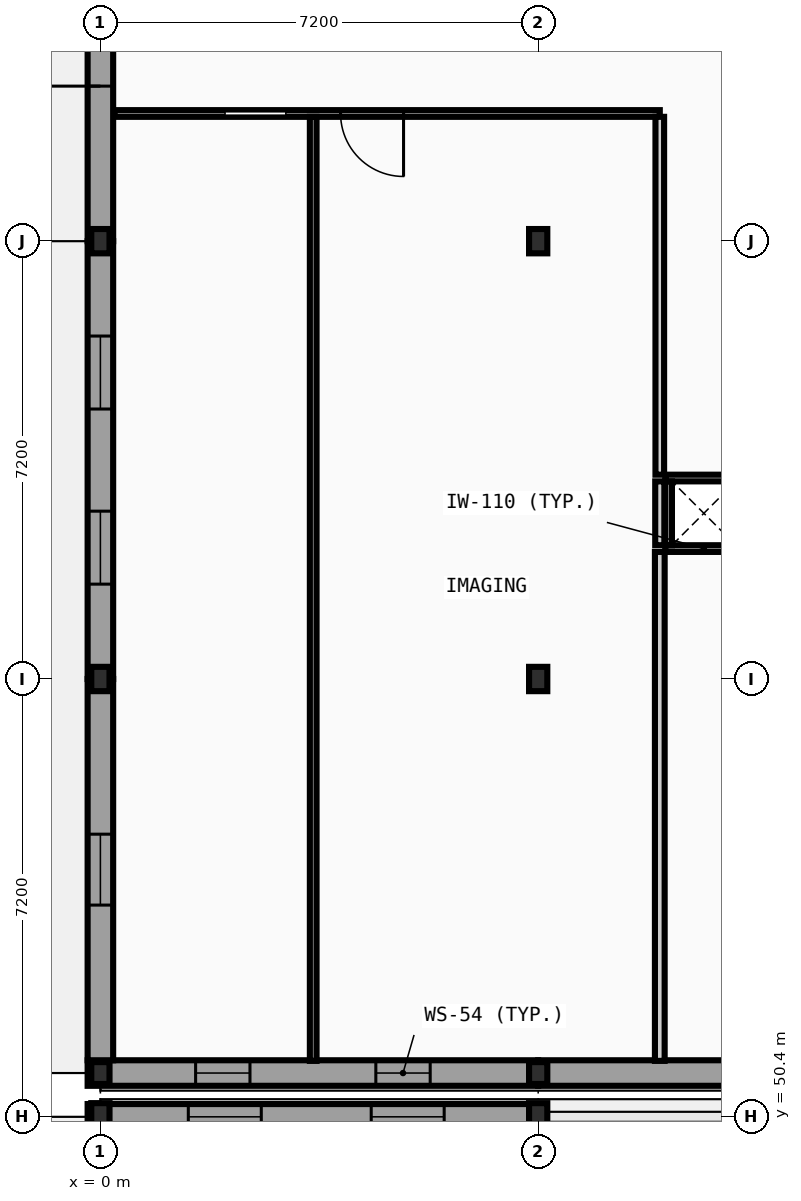
"""IFC4 building model, lengths in metres.
Left out: names, types, materials, properties, quantities, classifications, styles, units other than length and angle.
Written with IfcOpenShell. Run it as: python <this file> out.ifc"""

import sys

from ifc_helpers import new_model, si_unit, direction, frame, frame_2d, origin, origin_2d, place, context, subcontext, project, spatial, rectangle, i_section, extrude, element, fill, save


model = new_model("IFC4")
c1 = context("Model", 3, precision=1e-05, world=origin(), true_north=direction((0.0, 1.0)))
c2 = subcontext(c1, "Body", "Model", "MODEL_VIEW")
j1 = project(units=[si_unit("LENGTHUNIT", "METRE"), si_unit("PLANEANGLEUNIT", "RADIAN")], contexts=[c1])
p1 = place(None, origin())
s1 = spatial("IfcSite", under=j1, at=p1, CompositionType="ELEMENT")
p2 = place(p1, origin())
s2 = spatial("IfcBuilding", under=s1, at=p2, CompositionType="ELEMENT")
p3 = place(p2, origin())
s3 = spatial("IfcBuildingStorey", under=s2, at=p3, CompositionType="ELEMENT", Elevation=0.0)
p4 = place(p3, frame((0.0, 50.4, 0.0), z_axis=(0.0, 0.0, 1.0), x_axis=(1.0, 0.0, 0.0)))
e1 = element("IfcColumn", 1, at=p4, inside=s3, PredefinedType="COLUMN", context=c2, shape_type="SweptSolid", body=[
    extrude(i_section(OverallWidth=0.3, OverallDepth=0.45, WebThickness=0.014, FlangeThickness=0.026, FilletRadius=0.027, at=origin_2d()), origin(), (0.0, 0.0, 1.0), 5.2),
])
p5 = place(p3, frame((0.0, 51.12, 0.0), z_axis=(0.0, 0.0, 1.0), x_axis=(1.0, 0.0, 0.0)))
e2 = element("IfcColumn", 2, at=p5, inside=s3, PredefinedType="COLUMN", context=c2, shape_type="SweptSolid", body=[
    extrude(i_section(OverallWidth=0.3, OverallDepth=0.36, WebThickness=0.012, FlangeThickness=0.022, FilletRadius=0.027, at=origin_2d()), origin(), (0.0, 0.0, 1.0), 5.2),
])
for number, where, z_axis, x_axis in (
    (3, (0.0, 57.6, 0.0), (0.0, 0.0, 1.0), (1.0, 0.0, 0.0)),
    (4, (0.0, 64.8, 0.0), (0.0, 0.0, 1.0), (1.0, 0.0, 0.0)),
):
    element("IfcColumn", number, at=place(p3, frame(where, z_axis=z_axis, x_axis=x_axis)), inside=s3, PredefinedType="COLUMN", context=c2, shape_type="SweptSolid", body=[
        extrude(i_section(OverallWidth=0.3, OverallDepth=0.4, WebThickness=0.013, FlangeThickness=0.024, FilletRadius=0.027, at=origin_2d()), origin(), (0.0, 0.0, 1.0), 5.2),
    ])
p6 = place(p3, frame((7.2, 50.4, 0.0), z_axis=(0.0, 0.0, 1.0), x_axis=(1.0, 0.0, 0.0)))
e5 = element("IfcColumn", 5, at=p6, inside=s3, PredefinedType="COLUMN", context=c2, shape_type="SweptSolid", body=[
    extrude(i_section(OverallWidth=0.3, OverallDepth=0.45, WebThickness=0.014, FlangeThickness=0.026, FilletRadius=0.027, at=origin_2d()), origin(), (0.0, 0.0, 1.0), 5.2),
])
p7 = place(p3, frame((7.2, 51.12, 0.0), z_axis=(0.0, 0.0, 1.0), x_axis=(1.0, 0.0, 0.0)))
e6 = element("IfcColumn", 6, at=p7, inside=s3, PredefinedType="COLUMN", context=c2, shape_type="SweptSolid", body=[
    extrude(i_section(OverallWidth=0.3, OverallDepth=0.36, WebThickness=0.012, FlangeThickness=0.022, FilletRadius=0.027, at=origin_2d()), origin(), (0.0, 0.0, 1.0), 5.2),
])
for number, where, z_axis, x_axis in (
    (7, (7.2, 57.6, 0.0), (0.0, 0.0, 1.0), (1.0, 0.0, 0.0)),
    (8, (7.2, 64.8, 0.0), (0.0, 0.0, 1.0), (1.0, 0.0, 0.0)),
):
    element("IfcColumn", number, at=place(p3, frame(where, z_axis=z_axis, x_axis=x_axis)), inside=s3, PredefinedType="COLUMN", context=c2, shape_type="SweptSolid", body=[
        extrude(i_section(OverallWidth=0.3, OverallDepth=0.4, WebThickness=0.013, FlangeThickness=0.024, FilletRadius=0.027, at=origin_2d()), origin(), (0.0, 0.0, 1.0), 5.2),
    ])
p8 = place(p3, frame((7.31, 50.4, 0.0), z_axis=(0.0, 0.0, 1.0), x_axis=(-1.0, 0.0, 0.0)))
e9 = element("IfcWall", 9, at=p8, inside=s3, PredefinedType="STANDARD", context=c2, shape_type="SweptSolid", body=[
    extrude(rectangle(XDim=7.52, YDim=0.42, at=frame_2d((3.76, 0.0))), origin(), (0.0, 0.0, 1.0), 4.665),
])
p9 = place(p8, frame((1.656, 0.0, 0.9)))
e10 = element("IfcOpeningElement", 10, at=p9, cuts=e9, PredefinedType="OPENING", context=c2, shape_type="SweptSolid", body=[
    extrude(rectangle(XDim=1.2, YDim=1.8, at=frame_2d((0.6, 0.9))), frame((0.0, 0.22, 0.0), z_axis=(0.0, -1.0, 0.0), x_axis=(1.0, 0.0, 0.0)), (0.0, 0.0, 1.0), 0.44),
])
p10 = place(p8, frame((4.664, 0.0, 0.9)))
e11 = element("IfcOpeningElement", 11, at=p10, cuts=e9, PredefinedType="OPENING", context=c2, shape_type="SweptSolid", body=[
    extrude(rectangle(XDim=1.2, YDim=1.8, at=frame_2d((0.6, 0.9))), frame((0.0, 0.22, 0.0), z_axis=(0.0, -1.0, 0.0), x_axis=(1.0, 0.0, 0.0)), (0.0, 0.0, 1.0), 0.44),
])
p11 = place(p3, frame((-0.21, 51.12, 0.0), z_axis=(0.0, 0.0, 1.0), x_axis=(1.0, 0.0, 0.0)))
e12 = element("IfcWall", 12, at=p11, inside=s3, PredefinedType="STANDARD", context=c2, shape_type="SweptSolid", body=[
    extrude(rectangle(XDim=7.41, YDim=0.42, at=frame_2d((3.705, 0.0))), origin(), (0.0, 0.0, 1.0), 4.635),
])
p12 = place(p11, frame((1.776, 0.0, 0.95)))
e13 = element("IfcOpeningElement", 13, at=p12, cuts=e12, PredefinedType="OPENING", context=c2, shape_type="SweptSolid", body=[
    extrude(rectangle(XDim=0.894, YDim=1.404, at=frame_2d((0.447, 0.702))), frame((0.0, 0.22, 0.0), z_axis=(0.0, -1.0, 0.0), x_axis=(1.0, 0.0, 0.0)), (0.0, 0.0, 1.0), 0.44),
])
p13 = place(p11, frame((4.74, 0.0, 0.95)))
e14 = element("IfcOpeningElement", 14, at=p13, cuts=e12, PredefinedType="OPENING", context=c2, shape_type="SweptSolid", body=[
    extrude(rectangle(XDim=0.894, YDim=1.404, at=frame_2d((0.447, 0.702))), frame((0.0, 0.22, 0.0), z_axis=(0.0, -1.0, 0.0), x_axis=(1.0, 0.0, 0.0)), (0.0, 0.0, 1.0), 0.44),
])
p14 = place(p3, frame((7.2, 51.12, 0.0), z_axis=(0.0, 0.0, 1.0), x_axis=(1.0, 0.0, 0.0)))
e15 = element("IfcWall", 15, at=p14, inside=s3, PredefinedType="STANDARD", context=c2, shape_type="SweptSolid", body=[
    extrude(rectangle(XDim=7.2, YDim=0.42, at=frame_2d((3.6, 0.0))), origin(), (0.0, 0.0, 1.0), 4.635),
])
p15 = place(p14, frame((4.576, 0.0, 0.95)))
e16 = element("IfcOpeningElement", 16, at=p15, cuts=e15, PredefinedType="OPENING", context=c2, shape_type="SweptSolid", body=[
    extrude(rectangle(XDim=0.928, YDim=1.404, at=frame_2d((0.464, 0.702))), frame((0.0, 0.22, 0.0), z_axis=(0.0, -1.0, 0.0), x_axis=(1.0, 0.0, 0.0)), (0.0, 0.0, 1.0), 0.44),
])
p16 = place(p3, frame((0.0, 57.6, 0.0), z_axis=(0.0, 0.0, 1.0), x_axis=(0.0, -1.0, 0.0)))
e17 = element("IfcWall", 17, at=p16, inside=s3, PredefinedType="STANDARD", context=c2, shape_type="SweptSolid", body=[
    extrude(rectangle(XDim=6.27, YDim=0.42, at=frame_2d((3.135, 0.0))), origin(), (0.0, 0.0, 1.0), 4.565),
])
p17 = place(p16, frame((2.552, 0.0, 0.95)))
e18 = element("IfcOpeningElement", 18, at=p17, cuts=e17, PredefinedType="OPENING", context=c2, shape_type="SweptSolid", body=[
    extrude(rectangle(XDim=1.166, YDim=1.404, at=frame_2d((0.583, 0.702))), frame((0.0, 0.22, 0.0), z_axis=(0.0, -1.0, 0.0), x_axis=(1.0, 0.0, 0.0)), (0.0, 0.0, 1.0), 0.44),
])
p18 = place(p3, frame((0.0, 64.8, 0.0), z_axis=(0.0, 0.0, 1.0), x_axis=(0.0, -1.0, 0.0)))
e19 = element("IfcWall", 19, at=p18, inside=s3, PredefinedType="STANDARD", context=c2, shape_type="SweptSolid", body=[
    extrude(rectangle(XDim=7.2, YDim=0.42, at=frame_2d((3.6, 0.0))), origin(), (0.0, 0.0, 1.0), 4.565),
])
p19 = place(p18, frame((1.56, 0.0, 0.95)))
e20 = element("IfcOpeningElement", 20, at=p19, cuts=e19, PredefinedType="OPENING", context=c2, shape_type="SweptSolid", body=[
    extrude(rectangle(XDim=1.2, YDim=1.404, at=frame_2d((0.6, 0.702))), frame((0.0, 0.22, 0.0), z_axis=(0.0, -1.0, 0.0), x_axis=(1.0, 0.0, 0.0)), (0.0, 0.0, 1.0), 0.44),
])
p20 = place(p18, frame((4.44, 0.0, 0.95)))
e21 = element("IfcOpeningElement", 21, at=p20, cuts=e19, PredefinedType="OPENING", context=c2, shape_type="SweptSolid", body=[
    extrude(rectangle(XDim=1.2, YDim=1.404, at=frame_2d((0.6, 0.702))), frame((0.0, 0.22, 0.0), z_axis=(0.0, -1.0, 0.0), x_axis=(1.0, 0.0, 0.0)), (0.0, 0.0, 1.0), 0.44),
])
p21 = place(p3, frame((0.0, 72.0, 0.0), z_axis=(0.0, 0.0, 1.0), x_axis=(0.0, -1.0, 0.0)))
e22 = element("IfcWall", 22, at=p21, inside=s3, PredefinedType="STANDARD", context=c2, shape_type="SweptSolid", body=[
    extrude(rectangle(XDim=7.2, YDim=0.42, at=frame_2d((3.6, 0.0))), origin(), (0.0, 0.0, 1.0), 4.565),
])
p22 = place(p21, frame((2.55, 0.0, 0.0)))
e23 = element("IfcOpeningElement", 23, at=p22, cuts=e22, PredefinedType="OPENING", context=c2, shape_type="SweptSolid", body=[
    extrude(rectangle(XDim=2.1, YDim=2.4, at=frame_2d((1.05, 1.2))), frame((0.0, 0.22, 0.0), z_axis=(0.0, -1.0, 0.0), x_axis=(1.0, 0.0, 0.0)), (0.0, 0.0, 1.0), 0.44),
])
for number, where, z_axis, x_axis in (
    (24, (9.29, 59.745, 0.0), (0.0, 0.0, 1.0), (1.0, 0.0, 0.0)),
    (25, (9.29, 60.905, 0.0), (0.0, 0.0, 1.0), (1.0, 0.0, 0.0)),
):
    element("IfcWall", number, at=place(p3, frame(where, z_axis=z_axis, x_axis=x_axis)), inside=s3, PredefinedType="PARTITIONING", context=c2, shape_type="SweptSolid", body=[
        extrude(rectangle(XDim=1.27, YDim=0.11, at=frame_2d((0.635, 0.0))), origin(), (0.0, 0.0, 1.0), 4.94),
    ])
p23 = place(p3, frame((9.345, 59.8, 0.0), z_axis=(0.0, 0.0, 1.0), x_axis=(0.0, 1.0, 0.0)))
e26 = element("IfcWall", 26, at=p23, inside=s3, PredefinedType="PARTITIONING", context=c2, shape_type="SweptSolid", body=[
    extrude(rectangle(XDim=1.05, YDim=0.11, at=frame_2d((0.525, 0.0))), origin(), (0.0, 0.0, 1.0), 4.94),
])
p24 = place(p3, frame((0.23, 66.9, 0.0), z_axis=(0.0, 0.0, 1.0), x_axis=(1.0, 0.0, 0.0)))
e27 = element("IfcWall", 27, at=p24, inside=s3, PredefinedType="PARTITIONING", context=c2, shape_type="SweptSolid", body=[
    extrude(rectangle(XDim=8.97, YDim=0.11, at=frame_2d((4.485, 0.0))), origin(), (0.0, 0.0, 1.0), 4.94),
])
p25 = place(p24, frame((1.82, 0.0, 0.0)))
e28 = element("IfcOpeningElement", 28, at=p25, cuts=e27, PredefinedType="OPENING", context=c2, shape_type="SweptSolid", body=[
    extrude(rectangle(XDim=1.0, YDim=2.1, at=frame_2d((0.5, 1.05))), frame((0.0, 0.065, 0.0), z_axis=(0.0, -1.0, 0.0), x_axis=(1.0, 0.0, 0.0)), (0.0, 0.0, 1.0), 0.13),
])
p26 = place(p24, frame((3.72, 0.0, 0.0)))
e29 = element("IfcOpeningElement", 29, at=p26, cuts=e27, PredefinedType="OPENING", context=c2, shape_type="SweptSolid", body=[
    extrude(rectangle(XDim=1.036, YDim=2.096, at=frame_2d((0.518, 1.048))), frame((0.0, 0.065, 0.0), z_axis=(0.0, -1.0, 0.0), x_axis=(1.0, 0.0, 0.0)), (0.0, 0.0, 1.0), 0.13),
])
p27 = place(p3, frame((3.5, 51.32, 0.0), z_axis=(0.0, 0.0, 1.0), x_axis=(0.0, 1.0, 0.0)))
e30 = element("IfcWall", 30, at=p27, inside=s3, PredefinedType="PARTITIONING", context=c2, shape_type="SweptSolid", body=[
    extrude(rectangle(XDim=15.525, YDim=0.11, at=frame_2d((7.762, 0.0))), origin(), (0.0, 0.0, 1.0), 4.94),
])
p28 = place(p3, frame((9.2, 51.32, 0.0), z_axis=(0.0, 0.0, 1.0), x_axis=(0.0, 1.0, 0.0)))
e31 = element("IfcWall", 31, at=p28, inside=s3, PredefinedType="PARTITIONING", context=c2, shape_type="SweptSolid", body=[
    extrude(rectangle(XDim=8.37, YDim=0.16, at=frame_2d((4.185, 0.0))), origin(), (0.0, 0.0, 1.0), 4.94),
])
p29 = place(p3, frame((9.2, 59.8, 0.0), z_axis=(0.0, 0.0, 1.0), x_axis=(0.0, 1.0, 0.0)))
e32 = element("IfcWall", 32, at=p29, inside=s3, PredefinedType="PARTITIONING", context=c2, shape_type="SweptSolid", body=[
    extrude(rectangle(XDim=1.05, YDim=0.15, at=frame_2d((0.525, 0.0))), origin(), (0.0, 0.0, 1.0), 4.94),
])
p30 = place(p3, frame((9.2, 60.96, 0.0), z_axis=(0.0, 0.0, 1.0), x_axis=(0.0, 1.0, 0.0)))
e33 = element("IfcWall", 33, at=p30, inside=s3, PredefinedType="PARTITIONING", context=c2, shape_type="SweptSolid", body=[
    extrude(rectangle(XDim=5.885, YDim=0.142, at=frame_2d((2.942, 0.0))), origin(), (0.0, 0.0, 1.0), 4.94),
])
p31 = place(p9, origin())
e34 = element("IfcWindow", 34, at=p31, inside=s3, PartitioningType="SINGLE_PANEL", PredefinedType="WINDOW", context=c2, shape_type="SweptSolid", body=[
    extrude(rectangle(XDim=1.2, YDim=1.8, at=frame_2d((0.6, 0.9))), frame((0.0, 0.03, 0.0), z_axis=(0.0, -1.0, 0.0), x_axis=(1.0, 0.0, 0.0)), (0.0, 0.0, 1.0), 0.06),
])
fill(e10, e34)
p32 = place(p10, origin())
e35 = element("IfcWindow", 35, at=p32, inside=s3, PartitioningType="SINGLE_PANEL", PredefinedType="WINDOW", context=c2, shape_type="SweptSolid", body=[
    extrude(rectangle(XDim=1.2, YDim=1.8, at=frame_2d((0.6, 0.9))), frame((0.0, 0.03, 0.0), z_axis=(0.0, -1.0, 0.0), x_axis=(1.0, 0.0, 0.0)), (0.0, 0.0, 1.0), 0.06),
])
fill(e11, e35)
p33 = place(p12, origin())
e36 = element("IfcWindow", 36, at=p33, inside=s3, PartitioningType="SINGLE_PANEL", PredefinedType="WINDOW", context=c2, shape_type="SweptSolid", body=[
    extrude(rectangle(XDim=0.894, YDim=1.404, at=frame_2d((0.447, 0.702))), frame((0.0, 0.03, 0.0), z_axis=(0.0, -1.0, 0.0), x_axis=(1.0, 0.0, 0.0)), (0.0, 0.0, 1.0), 0.06),
])
fill(e13, e36)
p34 = place(p13, origin())
e37 = element("IfcWindow", 37, at=p34, inside=s3, PartitioningType="SINGLE_PANEL", PredefinedType="WINDOW", context=c2, shape_type="SweptSolid", body=[
    extrude(rectangle(XDim=0.894, YDim=1.404, at=frame_2d((0.447, 0.702))), frame((0.0, 0.03, 0.0), z_axis=(0.0, -1.0, 0.0), x_axis=(1.0, 0.0, 0.0)), (0.0, 0.0, 1.0), 0.06),
])
fill(e14, e37)
p35 = place(p17, origin())
e38 = element("IfcWindow", 38, at=p35, inside=s3, PartitioningType="SINGLE_PANEL", PredefinedType="WINDOW", context=c2, shape_type="SweptSolid", body=[
    extrude(rectangle(XDim=1.166, YDim=1.404, at=frame_2d((0.583, 0.702))), frame((0.0, 0.03, 0.0), z_axis=(0.0, -1.0, 0.0), x_axis=(1.0, 0.0, 0.0)), (0.0, 0.0, 1.0), 0.06),
])
fill(e18, e38)
p36 = place(p19, origin())
e39 = element("IfcWindow", 39, at=p36, inside=s3, PartitioningType="SINGLE_PANEL", PredefinedType="WINDOW", context=c2, shape_type="SweptSolid", body=[
    extrude(rectangle(XDim=1.2, YDim=1.404, at=frame_2d((0.6, 0.702))), frame((0.0, 0.03, 0.0), z_axis=(0.0, -1.0, 0.0), x_axis=(1.0, 0.0, 0.0)), (0.0, 0.0, 1.0), 0.06),
])
fill(e20, e39)
p37 = place(p20, origin())
e40 = element("IfcWindow", 40, at=p37, inside=s3, PartitioningType="SINGLE_PANEL", PredefinedType="WINDOW", context=c2, shape_type="SweptSolid", body=[
    extrude(rectangle(XDim=1.2, YDim=1.404, at=frame_2d((0.6, 0.702))), frame((0.0, 0.03, 0.0), z_axis=(0.0, -1.0, 0.0), x_axis=(1.0, 0.0, 0.0)), (0.0, 0.0, 1.0), 0.06),
])
fill(e21, e40)
p38 = place(p22, origin())
e41 = element("IfcDoor", 41, at=p38, inside=s3, OperationType="DOUBLE_DOOR_SINGLE_SWING", PredefinedType="DOOR", context=c2, shape_type="SweptSolid", body=[
    extrude(rectangle(XDim=2.1, YDim=2.4, at=frame_2d((1.05, 1.2))), frame((0.0, 0.025, 0.0), z_axis=(0.0, -1.0, 0.0), x_axis=(1.0, 0.0, 0.0)), (0.0, 0.0, 1.0), 0.05),
])
fill(e23, e41)
p39 = place(p25, origin())
e42 = element("IfcDoor", 42, at=p39, inside=s3, OperationType="SLIDING_TO_LEFT", PredefinedType="DOOR", context=c2, shape_type="SweptSolid", body=[
    extrude(rectangle(XDim=1.0, YDim=2.1, at=frame_2d((0.5, 1.05))), frame((0.0, 0.025, 0.0), z_axis=(0.0, -1.0, 0.0), x_axis=(1.0, 0.0, 0.0)), (0.0, 0.0, 1.0), 0.05),
])
fill(e28, e42)
p40 = place(p26, origin())
e43 = element("IfcDoor", 43, at=p40, inside=s3, OperationType="SINGLE_SWING_RIGHT", PredefinedType="DOOR", context=c2, shape_type="SweptSolid", body=[
    extrude(rectangle(XDim=1.036, YDim=2.096, at=frame_2d((0.518, 1.048))), frame((0.0, 0.025, 0.0), z_axis=(0.0, -1.0, 0.0), x_axis=(1.0, 0.0, 0.0)), (0.0, 0.0, 1.0), 0.05),
])
fill(e29, e43)
save(model, sys.argv[1])
